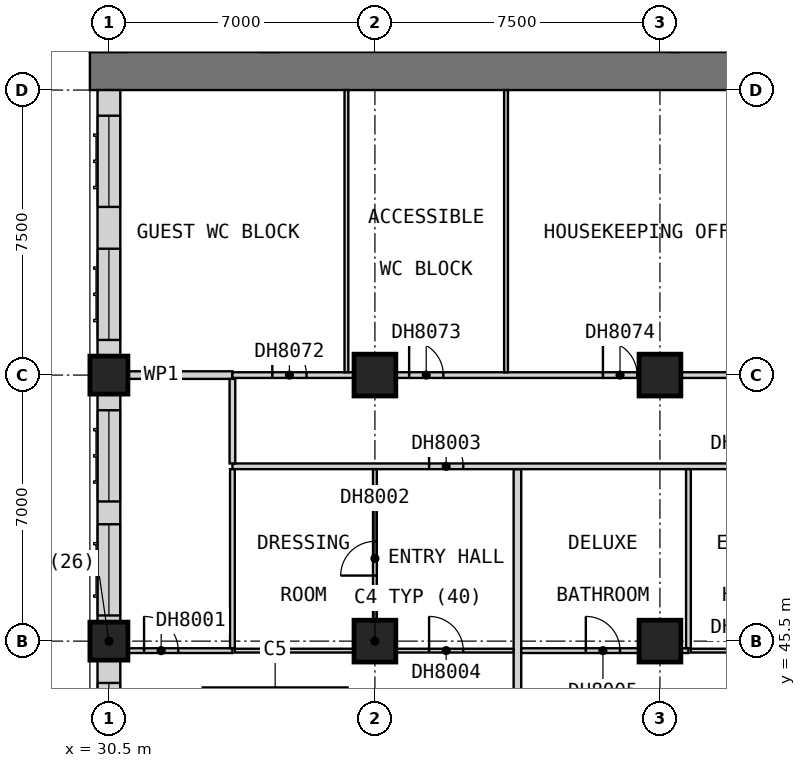
"""IFC4 building model, lengths in metres.
Left out: names, types, materials, properties, quantities, classifications, styles, units other than length and angle.
Written with IfcOpenShell. Run it as: python <this file> out.ifc"""

import sys

from ifc_helpers import new_model, si_unit, direction, frame, frame_2d, origin, origin_2d, place, context, subcontext, project, spatial, rectangle, extrude, element, fill, save


model = new_model("IFC4")
c1 = context("Model", 3, precision=1e-05, world=origin(), true_north=direction((0.0, 1.0)))
c2 = subcontext(c1, "Body", "Model", "MODEL_VIEW")
j1 = project(units=[si_unit("LENGTHUNIT", "METRE"), si_unit("PLANEANGLEUNIT", "RADIAN")], contexts=[c1])
p1 = place(None, origin())
s1 = spatial("IfcSite", under=j1, at=p1, CompositionType="ELEMENT")
p2 = place(p1, origin())
s2 = spatial("IfcBuilding", under=s1, at=p2, CompositionType="ELEMENT")
p3 = place(p2, frame((0.0, 0.0, 89.9)))
s3 = spatial("IfcBuildingStorey", under=s2, at=p3, CompositionType="ELEMENT", Elevation=89.9)
for number, where, z_axis, x_axis in (
    (1, (30.5, 45.5, 0.0), (0.0, 0.0, 1.0), (1.0, 0.0, 0.0)),
    (2, (30.5, 52.5, 0.0), (0.0, 0.0, 1.0), (1.0, 0.0, 0.0)),
):
    element("IfcColumn", number, at=place(p3, frame(where, z_axis=z_axis, x_axis=x_axis)), inside=s3, PredefinedType="COLUMN", context=c2, shape_type="SweptSolid", body=[
        extrude(rectangle(XDim=1.0, YDim=1.0, at=origin_2d()), origin(), (0.0, 0.0, 1.0), 3.6),
    ])
for number, where, z_axis, x_axis in (
    (3, (37.5, 45.5, 0.0), (0.0, 0.0, 1.0), (1.0, 0.0, 0.0)),
    (4, (37.5, 52.5, 0.0), (0.0, 0.0, 1.0), (1.0, 0.0, 0.0)),
    (5, (45.0, 45.5, 0.0), (0.0, 0.0, 1.0), (1.0, 0.0, 0.0)),
    (6, (45.0, 52.5, 0.0), (0.0, 0.0, 1.0), (1.0, 0.0, 0.0)),
):
    element("IfcColumn", number, at=place(p3, frame(where, z_axis=z_axis, x_axis=x_axis)), inside=s3, PredefinedType="COLUMN", context=c2, shape_type="SweptSolid", body=[
        extrude(rectangle(XDim=1.1, YDim=1.1, at=origin_2d()), origin(), (0.0, 0.0, 1.0), 3.6),
    ])
p4 = place(p3, frame((30.0, 60.5, 0.0), z_axis=(0.0, 0.0, 1.0), x_axis=(1.0, 0.0, 0.0)))
e7 = element("IfcWall", 7, at=p4, inside=s3, PredefinedType="SHEAR", context=c2, shape_type="SweptSolid", body=[
    extrude(rectangle(XDim=30.0, YDim=1.0, at=frame_2d((15.0, 0.0))), origin(), (0.0, 0.0, 1.0), 3.6),
])
p5 = place(p4, frame((21.9, 0.0, 0.0)))
e8 = element("IfcOpeningElement", 8, at=p5, cuts=e7, PredefinedType="OPENING", context=c2, shape_type="SweptSolid", body=[
    extrude(rectangle(XDim=1.8, YDim=2.1, at=frame_2d((0.9, 1.05))), frame((0.0, 0.51, 0.0), z_axis=(0.0, -1.0, 0.0), x_axis=(1.0, 0.0, 0.0)), (0.0, 0.0, 1.0), 1.02),
])
p6 = place(p4, frame((26.5, 0.0, 0.0)))
e9 = element("IfcOpeningElement", 9, at=p6, cuts=e7, PredefinedType="OPENING", context=c2, shape_type="SweptSolid", body=[
    extrude(rectangle(XDim=1.2, YDim=2.1, at=frame_2d((0.6, 1.05))), frame((0.0, 0.51, 0.0), z_axis=(0.0, -1.0, 0.0), x_axis=(1.0, 0.0, 0.0)), (0.0, 0.0, 1.0), 1.02),
])
p7 = place(p3, frame((30.5, 60.0, 0.0), z_axis=(0.0, 0.0, 1.0), x_axis=(0.0, -1.0, 0.0)))
e10 = element("IfcWall", 10, at=p7, inside=s3, PredefinedType="SOLIDWALL", context=c2, shape_type="SweptSolid", body=[
    extrude(rectangle(XDim=7.0, YDim=0.6, at=frame_2d((3.5, 0.0))), origin(), (0.0, 0.0, 1.0), 3.35),
])
p8 = place(p7, frame((4.175, 0.0, 0.8)))
e11 = element("IfcOpeningElement", 11, at=p8, cuts=e10, PredefinedType="OPENING", context=c2, shape_type="SweptSolid", body=[
    extrude(rectangle(XDim=2.4, YDim=1.8, at=frame_2d((1.2, 0.9))), frame((0.0, 0.31, 0.0), z_axis=(0.0, -1.0, 0.0), x_axis=(1.0, 0.0, 0.0)), (0.0, 0.0, 1.0), 0.62),
])
p9 = place(p7, frame((0.675, 0.0, 0.8)))
e12 = element("IfcOpeningElement", 12, at=p9, cuts=e10, PredefinedType="OPENING", context=c2, shape_type="SweptSolid", body=[
    extrude(rectangle(XDim=2.4, YDim=1.8, at=frame_2d((1.2, 0.9))), frame((0.0, 0.31, 0.0), z_axis=(0.0, -1.0, 0.0), x_axis=(1.0, 0.0, 0.0)), (0.0, 0.0, 1.0), 0.62),
])
p10 = place(p3, frame((30.5, 52.0, 0.0), z_axis=(0.0, 0.0, 1.0), x_axis=(0.0, -1.0, 0.0)))
e13 = element("IfcWall", 13, at=p10, inside=s3, PredefinedType="SOLIDWALL", context=c2, shape_type="SweptSolid", body=[
    extrude(rectangle(XDim=6.0, YDim=0.6, at=frame_2d((3.0, 0.0))), origin(), (0.0, 0.0, 1.0), 2.85),
])
p11 = place(p10, frame((3.425, 0.0, 0.8)))
e14 = element("IfcOpeningElement", 14, at=p11, cuts=e13, PredefinedType="OPENING", context=c2, shape_type="SweptSolid", body=[
    extrude(rectangle(XDim=2.4, YDim=1.8, at=frame_2d((1.2, 0.9))), frame((0.0, 0.31, 0.0), z_axis=(0.0, -1.0, 0.0), x_axis=(1.0, 0.0, 0.0)), (0.0, 0.0, 1.0), 0.62),
])
p12 = place(p10, frame((0.425, 0.0, 0.8)))
e15 = element("IfcOpeningElement", 15, at=p12, cuts=e13, PredefinedType="OPENING", context=c2, shape_type="SweptSolid", body=[
    extrude(rectangle(XDim=2.4, YDim=1.8, at=frame_2d((1.2, 0.9))), frame((0.0, 0.31, 0.0), z_axis=(0.0, -1.0, 0.0), x_axis=(1.0, 0.0, 0.0)), (0.0, 0.0, 1.0), 0.62),
])
p13 = place(p3, frame((30.5, 45.0, 0.0), z_axis=(0.0, 0.0, 1.0), x_axis=(0.0, -1.0, 0.0)))
e16 = element("IfcWall", 16, at=p13, inside=s3, PredefinedType="SOLIDWALL", context=c2, shape_type="SweptSolid", body=[
    extrude(rectangle(XDim=4.5, YDim=0.6, at=frame_2d((2.25, 0.0))), origin(), (0.0, 0.0, 1.0), 2.85),
])
p14 = place(p13, frame((0.6, 0.0, 0.8)))
e17 = element("IfcOpeningElement", 17, at=p14, cuts=e16, PredefinedType="OPENING", context=c2, shape_type="SweptSolid", body=[
    extrude(rectangle(XDim=2.4, YDim=1.8, at=frame_2d((1.2, 0.9))), frame((0.0, 0.31, 0.0), z_axis=(0.0, -1.0, 0.0), x_axis=(1.0, 0.0, 0.0)), (0.0, 0.0, 1.0), 0.62),
])
p15 = place(p3, frame((30.0, 52.5, 0.0), z_axis=(0.0, 0.0, 1.0), x_axis=(1.0, 0.0, 0.0)))
e18 = element("IfcWall", 18, at=p15, inside=s3, PredefinedType="PARTITIONING", context=c2, shape_type="SweptSolid", body=[
    extrude(rectangle(XDim=3.75, YDim=0.2, at=frame_2d((1.875, 0.0))), origin(), (0.0, 0.0, 1.0), 3.35),
])
p16 = place(p3, frame((41.25, 38.31, 0.0), z_axis=(0.0, 0.0, 1.0), x_axis=(0.0, 1.0, 0.0)))
e19 = element("IfcWall", 19, at=p16, inside=s3, PredefinedType="PARTITIONING", context=c2, shape_type="SweptSolid", body=[
    extrude(rectangle(XDim=11.715, YDim=0.2, at=frame_2d((5.857, 0.0))), origin(), (0.0, 0.0, 1.0), 3.35),
])
p17 = place(p3, frame((33.75, 50.1, 0.0), z_axis=(0.0, 0.0, 1.0), x_axis=(1.0, 0.0, 0.0)))
e20 = element("IfcWall", 20, at=p17, inside=s3, PredefinedType="PARTITIONING", context=c2, shape_type="SweptSolid", body=[
    extrude(rectangle(XDim=43.65, YDim=0.15, at=frame_2d((21.825, 0.0))), origin(), (0.0, 0.0, 1.0), 3.35),
])
p18 = place(p17, frame((5.175, 0.0, 0.0)))
e21 = element("IfcOpeningElement", 21, at=p18, cuts=e20, PredefinedType="OPENING", context=c2, shape_type="SweptSolid", body=[
    extrude(rectangle(XDim=0.9, YDim=2.1, at=frame_2d((0.45, 1.05))), frame((0.0, 0.085, 0.0), z_axis=(0.0, -1.0, 0.0), x_axis=(1.0, 0.0, 0.0)), (0.0, 0.0, 1.0), 0.17),
])
p19 = place(p17, frame((13.05, 0.0, 0.0)))
e22 = element("IfcOpeningElement", 22, at=p19, cuts=e20, PredefinedType="OPENING", context=c2, shape_type="SweptSolid", body=[
    extrude(rectangle(XDim=0.9, YDim=2.1, at=frame_2d((0.45, 1.05))), frame((0.0, 0.085, 0.0), z_axis=(0.0, -1.0, 0.0), x_axis=(1.0, 0.0, 0.0)), (0.0, 0.0, 1.0), 0.17),
])
p20 = place(p17, frame((17.363, 0.0, 0.0)))
e23 = element("IfcOpeningElement", 23, at=p20, cuts=e20, PredefinedType="OPENING", context=c2, shape_type="SweptSolid", body=[
    extrude(rectangle(XDim=0.9, YDim=2.1, at=frame_2d((0.45, 1.05))), frame((0.0, 0.085, 0.0), z_axis=(0.0, -1.0, 0.0), x_axis=(1.0, 0.0, 0.0)), (0.0, 0.0, 1.0), 0.17),
])
p21 = place(p17, frame((21.113, 0.0, 0.0)))
e24 = element("IfcOpeningElement", 24, at=p21, cuts=e20, PredefinedType="OPENING", context=c2, shape_type="SweptSolid", body=[
    extrude(rectangle(XDim=0.9, YDim=2.1, at=frame_2d((0.45, 1.05))), frame((0.0, 0.085, 0.0), z_axis=(0.0, -1.0, 0.0), x_axis=(1.0, 0.0, 0.0)), (0.0, 0.0, 1.0), 0.17),
])
p22 = place(p17, frame((28.05, 0.0, 0.0)))
e25 = element("IfcOpeningElement", 25, at=p22, cuts=e20, PredefinedType="OPENING", context=c2, shape_type="SweptSolid", body=[
    extrude(rectangle(XDim=0.9, YDim=2.1, at=frame_2d((0.45, 1.05))), frame((0.0, 0.085, 0.0), z_axis=(0.0, -1.0, 0.0), x_axis=(1.0, 0.0, 0.0)), (0.0, 0.0, 1.0), 0.17),
])
p23 = place(p17, frame((32.363, 0.0, 0.0)))
e26 = element("IfcOpeningElement", 26, at=p23, cuts=e20, PredefinedType="OPENING", context=c2, shape_type="SweptSolid", body=[
    extrude(rectangle(XDim=0.9, YDim=2.1, at=frame_2d((0.45, 1.05))), frame((0.0, 0.085, 0.0), z_axis=(0.0, -1.0, 0.0), x_axis=(1.0, 0.0, 0.0)), (0.0, 0.0, 1.0), 0.17),
])
p24 = place(p17, frame((39.3, 0.0, 0.0)))
e27 = element("IfcOpeningElement", 27, at=p24, cuts=e20, PredefinedType="OPENING", context=c2, shape_type="SweptSolid", body=[
    extrude(rectangle(XDim=0.9, YDim=2.1, at=frame_2d((0.45, 1.05))), frame((0.0, 0.085, 0.0), z_axis=(0.0, -1.0, 0.0), x_axis=(1.0, 0.0, 0.0)), (0.0, 0.0, 1.0), 0.17),
])
p25 = place(p17, frame((42.0, 0.0, 0.0)))
e28 = element("IfcOpeningElement", 28, at=p25, cuts=e20, PredefinedType="OPENING", context=c2, shape_type="SweptSolid", body=[
    extrude(rectangle(XDim=0.9, YDim=2.1, at=frame_2d((0.45, 1.05))), frame((0.0, 0.085, 0.0), z_axis=(0.0, -1.0, 0.0), x_axis=(1.0, 0.0, 0.0)), (0.0, 0.0, 1.0), 0.17),
])
p26 = place(p3, frame((33.75, 52.5, 0.0), z_axis=(0.0, 0.0, 1.0), x_axis=(1.0, 0.0, 0.0)))
e29 = element("IfcWall", 29, at=p26, inside=s3, PredefinedType="PARTITIONING", context=c2, shape_type="SweptSolid", body=[
    extrude(rectangle(XDim=17.15, YDim=0.15, at=frame_2d((8.575, 0.0))), origin(), (0.0, 0.0, 1.0), 3.35),
])
p27 = place(p26, frame((1.05, 0.0, 0.0)))
e30 = element("IfcOpeningElement", 30, at=p27, cuts=e29, PredefinedType="OPENING", context=c2, shape_type="SweptSolid", body=[
    extrude(rectangle(XDim=0.9, YDim=2.1, at=frame_2d((0.45, 1.05))), frame((0.0, 0.085, 0.0), z_axis=(0.0, -1.0, 0.0), x_axis=(1.0, 0.0, 0.0)), (0.0, 0.0, 1.0), 0.17),
])
p28 = place(p26, frame((4.65, 0.0, 0.0)))
e31 = element("IfcOpeningElement", 31, at=p28, cuts=e29, PredefinedType="OPENING", context=c2, shape_type="SweptSolid", body=[
    extrude(rectangle(XDim=0.9, YDim=2.1, at=frame_2d((0.45, 1.05))), frame((0.0, 0.085, 0.0), z_axis=(0.0, -1.0, 0.0), x_axis=(1.0, 0.0, 0.0)), (0.0, 0.0, 1.0), 0.17),
])
p29 = place(p26, frame((9.75, 0.0, 0.0)))
e32 = element("IfcOpeningElement", 32, at=p29, cuts=e29, PredefinedType="OPENING", context=c2, shape_type="SweptSolid", body=[
    extrude(rectangle(XDim=0.9, YDim=2.1, at=frame_2d((0.45, 1.05))), frame((0.0, 0.085, 0.0), z_axis=(0.0, -1.0, 0.0), x_axis=(1.0, 0.0, 0.0)), (0.0, 0.0, 1.0), 0.17),
])
p30 = place(p26, frame((15.625, 0.0, 0.0)))
e33 = element("IfcOpeningElement", 33, at=p30, cuts=e29, PredefinedType="OPENING", context=c2, shape_type="SweptSolid", body=[
    extrude(rectangle(XDim=0.9, YDim=2.1, at=frame_2d((0.45, 1.05))), frame((0.0, 0.085, 0.0), z_axis=(0.0, -1.0, 0.0), x_axis=(1.0, 0.0, 0.0)), (0.0, 0.0, 1.0), 0.17),
])
p31 = place(p3, frame((33.75, 50.175, 0.0), z_axis=(0.0, 0.0, 1.0), x_axis=(0.0, 1.0, 0.0)))
e34 = element("IfcWall", 34, at=p31, inside=s3, PredefinedType="PARTITIONING", context=c2, shape_type="SweptSolid", body=[
    extrude(rectangle(XDim=2.225, YDim=0.15, at=frame_2d((1.112, 0.0))), origin(), (0.0, 0.0, 1.0), 3.35),
])
p32 = place(p3, frame((33.812, 45.25, 0.0), z_axis=(0.0, 0.0, 1.0), x_axis=(1.0, 0.0, 0.0)))
e35 = element("IfcWall", 35, at=p32, inside=s3, PredefinedType="PARTITIONING", context=c2, shape_type="SweptSolid", body=[
    extrude(rectangle(XDim=7.337, YDim=0.1, at=frame_2d((3.669, 0.0))), origin(), (0.0, 0.0, 1.0), 3.35),
])
p33 = place(p32, frame((5.113, 0.0, 0.0)))
e36 = element("IfcOpeningElement", 36, at=p33, cuts=e35, PredefinedType="OPENING", context=c2, shape_type="SweptSolid", body=[
    extrude(rectangle(XDim=0.9, YDim=2.1, at=frame_2d((0.45, 1.05))), frame((0.0, 0.06, 0.0), z_axis=(0.0, -1.0, 0.0), x_axis=(1.0, 0.0, 0.0)), (0.0, 0.0, 1.0), 0.12),
])
p34 = place(p3, frame((45.812, 45.25, 0.0), z_axis=(0.0, 0.0, 1.0), x_axis=(1.0, 0.0, 0.0)))
e37 = element("IfcWall", 37, at=p34, inside=s3, PredefinedType="PARTITIONING", context=c2, shape_type="SweptSolid", body=[
    extrude(rectangle(XDim=2.837, YDim=0.1, at=frame_2d((1.419, 0.0))), origin(), (0.0, 0.0, 1.0), 3.35),
])
p35 = place(p34, frame((0.988, 0.0, 0.0)))
e38 = element("IfcOpeningElement", 38, at=p35, cuts=e37, PredefinedType="OPENING", context=c2, shape_type="SweptSolid", body=[
    extrude(rectangle(XDim=0.9, YDim=2.1, at=frame_2d((0.45, 1.05))), frame((0.0, 0.06, 0.0), z_axis=(0.0, -1.0, 0.0), x_axis=(1.0, 0.0, 0.0)), (0.0, 0.0, 1.0), 0.12),
])
p36 = place(p3, frame((36.75, 52.575, 0.0), z_axis=(0.0, 0.0, 1.0), x_axis=(0.0, 1.0, 0.0)))
e39 = element("IfcWall", 39, at=p36, inside=s3, PredefinedType="PARTITIONING", context=c2, shape_type="SweptSolid", body=[
    extrude(rectangle(XDim=7.425, YDim=0.1, at=frame_2d((3.712, 0.0))), origin(), (0.0, 0.0, 1.0), 3.35),
])
p37 = place(p3, frame((37.5, 45.3, 0.0), z_axis=(0.0, 0.0, 1.0), x_axis=(0.0, 1.0, 0.0)))
e40 = element("IfcWall", 40, at=p37, inside=s3, PredefinedType="PARTITIONING", context=c2, shape_type="SweptSolid", body=[
    extrude(rectangle(XDim=4.725, YDim=0.1, at=frame_2d((2.362, 0.0))), origin(), (0.0, 0.0, 1.0), 3.35),
])
p38 = place(p37, frame((1.925, 0.0, 0.0)))
e41 = element("IfcOpeningElement", 41, at=p38, cuts=e40, PredefinedType="OPENING", context=c2, shape_type="SweptSolid", body=[
    extrude(rectangle(XDim=0.9, YDim=2.1, at=frame_2d((0.45, 1.05))), frame((0.0, 0.06, 0.0), z_axis=(0.0, -1.0, 0.0), x_axis=(1.0, 0.0, 0.0)), (0.0, 0.0, 1.0), 0.12),
])
p39 = place(p3, frame((40.95, 52.575, 0.0), z_axis=(0.0, 0.0, 1.0), x_axis=(0.0, 1.0, 0.0)))
e42 = element("IfcWall", 42, at=p39, inside=s3, PredefinedType="PARTITIONING", context=c2, shape_type="SweptSolid", body=[
    extrude(rectangle(XDim=7.425, YDim=0.1, at=frame_2d((3.712, 0.0))), origin(), (0.0, 0.0, 1.0), 3.35),
])
p40 = place(p3, frame((30.0, 45.25, 0.0), z_axis=(0.0, 0.0, 1.0), x_axis=(1.0, 0.0, 0.0)))
e43 = element("IfcWall", 43, at=p40, inside=s3, PredefinedType="PARTITIONING", context=c2, shape_type="SweptSolid", body=[
    extrude(rectangle(XDim=3.75, YDim=0.125, at=frame_2d((1.875, 0.0))), origin(), (0.0, 0.0, 1.0), 3.35),
])
p41 = place(p40, frame((1.425, 0.0, 0.0)))
e44 = element("IfcOpeningElement", 44, at=p41, cuts=e43, PredefinedType="OPENING", context=c2, shape_type="SweptSolid", body=[
    extrude(rectangle(XDim=0.9, YDim=2.1, at=frame_2d((0.45, 1.05))), frame((0.0, 0.073, 0.0), z_axis=(0.0, -1.0, 0.0), x_axis=(1.0, 0.0, 0.0)), (0.0, 0.0, 1.0), 0.145),
])
p42 = place(p3, frame((41.35, 45.25, 0.0), z_axis=(0.0, 0.0, 1.0), x_axis=(1.0, 0.0, 0.0)))
e45 = element("IfcWall", 45, at=p42, inside=s3, PredefinedType="PARTITIONING", context=c2, shape_type="SweptSolid", body=[
    extrude(rectangle(XDim=4.4, YDim=0.125, at=frame_2d((2.2, 0.0))), origin(), (0.0, 0.0, 1.0), 3.35),
])
p43 = place(p42, frame((1.7, 0.0, 0.0)))
e46 = element("IfcOpeningElement", 46, at=p43, cuts=e45, PredefinedType="OPENING", context=c2, shape_type="SweptSolid", body=[
    extrude(rectangle(XDim=0.9, YDim=2.1, at=frame_2d((0.45, 1.05))), frame((0.0, 0.073, 0.0), z_axis=(0.0, -1.0, 0.0), x_axis=(1.0, 0.0, 0.0)), (0.0, 0.0, 1.0), 0.145),
])
for number, where, z_axis, x_axis in (
    (47, (33.75, 45.312, 0.0), (0.0, 0.0, 1.0), (0.0, 1.0, 0.0)),
    (48, (45.75, 45.312, 0.0), (0.0, 0.0, 1.0), (0.0, 1.0, 0.0)),
):
    element("IfcWall", number, at=place(p3, frame(where, z_axis=z_axis, x_axis=x_axis)), inside=s3, PredefinedType="PARTITIONING", context=c2, shape_type="SweptSolid", body=[
        extrude(rectangle(XDim=4.712, YDim=0.125, at=frame_2d((2.356, 0.0))), origin(), (0.0, 0.0, 1.0), 3.35),
    ])
p44 = place(p8, origin())
e49 = element("IfcWindow", 49, at=p44, inside=s3, PartitioningType="SINGLE_PANEL", PredefinedType="WINDOW", context=c2, shape_type="SweptSolid", body=[
    extrude(rectangle(XDim=2.4, YDim=1.8, at=frame_2d((1.2, 0.9))), frame((0.0, -0.07, 0.0), z_axis=(0.0, -1.0, 0.0), x_axis=(1.0, 0.0, 0.0)), (0.0, 0.0, 1.0), 0.06),
])
fill(e11, e49)
p45 = place(p9, origin())
e50 = element("IfcWindow", 50, at=p45, inside=s3, PartitioningType="SINGLE_PANEL", PredefinedType="WINDOW", context=c2, shape_type="SweptSolid", body=[
    extrude(rectangle(XDim=2.4, YDim=1.8, at=frame_2d((1.2, 0.9))), frame((0.0, -0.07, 0.0), z_axis=(0.0, -1.0, 0.0), x_axis=(1.0, 0.0, 0.0)), (0.0, 0.0, 1.0), 0.06),
])
fill(e12, e50)
p46 = place(p11, origin())
e51 = element("IfcWindow", 51, at=p46, inside=s3, PartitioningType="SINGLE_PANEL", PredefinedType="WINDOW", context=c2, shape_type="SweptSolid", body=[
    extrude(rectangle(XDim=2.4, YDim=1.8, at=frame_2d((1.2, 0.9))), frame((0.0, -0.07, 0.0), z_axis=(0.0, -1.0, 0.0), x_axis=(1.0, 0.0, 0.0)), (0.0, 0.0, 1.0), 0.06),
])
fill(e14, e51)
p47 = place(p12, origin())
e52 = element("IfcWindow", 52, at=p47, inside=s3, PartitioningType="SINGLE_PANEL", PredefinedType="WINDOW", context=c2, shape_type="SweptSolid", body=[
    extrude(rectangle(XDim=2.4, YDim=1.8, at=frame_2d((1.2, 0.9))), frame((0.0, -0.07, 0.0), z_axis=(0.0, -1.0, 0.0), x_axis=(1.0, 0.0, 0.0)), (0.0, 0.0, 1.0), 0.06),
])
fill(e15, e52)
p48 = place(p14, origin())
e53 = element("IfcWindow", 53, at=p48, inside=s3, PartitioningType="SINGLE_PANEL", PredefinedType="WINDOW", context=c2, shape_type="SweptSolid", body=[
    extrude(rectangle(XDim=2.4, YDim=1.8, at=frame_2d((1.2, 0.9))), frame((0.0, -0.07, 0.0), z_axis=(0.0, -1.0, 0.0), x_axis=(1.0, 0.0, 0.0)), (0.0, 0.0, 1.0), 0.06),
])
fill(e17, e53)
p49 = place(p41, origin())
e54 = element("IfcDoor", 54, at=p49, inside=s3, OperationType="SINGLE_SWING_LEFT", PredefinedType="DOOR", context=c2, shape_type="SweptSolid", body=[
    extrude(rectangle(XDim=0.9, YDim=2.1, at=frame_2d((0.45, 1.05))), frame((0.0, 0.025, 0.0), z_axis=(0.0, -1.0, 0.0), x_axis=(1.0, 0.0, 0.0)), (0.0, 0.0, 1.0), 0.05),
])
fill(e44, e54)
p50 = place(p38, origin())
e55 = element("IfcDoor", 55, at=p50, inside=s3, OperationType="SINGLE_SWING_RIGHT", PredefinedType="DOOR", context=c2, shape_type="SweptSolid", body=[
    extrude(rectangle(XDim=0.9, YDim=2.1, at=frame_2d((0.45, 1.05))), frame((0.0, 0.025, 0.0), z_axis=(0.0, -1.0, 0.0), x_axis=(1.0, 0.0, 0.0)), (0.0, 0.0, 1.0), 0.05),
])
fill(e41, e55)
p51 = place(p18, origin())
e56 = element("IfcDoor", 56, at=p51, inside=s3, OperationType="SINGLE_SWING_RIGHT", PredefinedType="DOOR", context=c2, shape_type="SweptSolid", body=[
    extrude(rectangle(XDim=0.9, YDim=2.1, at=frame_2d((0.45, 1.05))), frame((0.0, 0.025, 0.0), z_axis=(0.0, -1.0, 0.0), x_axis=(1.0, 0.0, 0.0)), (0.0, 0.0, 1.0), 0.05),
])
fill(e21, e56)
p52 = place(p33, origin())
e57 = element("IfcDoor", 57, at=p52, inside=s3, OperationType="SINGLE_SWING_LEFT", PredefinedType="DOOR", context=c2, shape_type="SweptSolid", body=[
    extrude(rectangle(XDim=0.9, YDim=2.1, at=frame_2d((0.45, 1.05))), frame((0.0, 0.025, 0.0), z_axis=(0.0, -1.0, 0.0), x_axis=(1.0, 0.0, 0.0)), (0.0, 0.0, 1.0), 0.05),
])
fill(e36, e57)
p53 = place(p43, origin())
e58 = element("IfcDoor", 58, at=p53, inside=s3, OperationType="SINGLE_SWING_LEFT", PredefinedType="DOOR", context=c2, shape_type="SweptSolid", body=[
    extrude(rectangle(XDim=0.9, YDim=2.1, at=frame_2d((0.45, 1.05))), frame((0.0, 0.025, 0.0), z_axis=(0.0, -1.0, 0.0), x_axis=(1.0, 0.0, 0.0)), (0.0, 0.0, 1.0), 0.05),
])
fill(e46, e58)
p54 = place(p27, origin())
e59 = element("IfcDoor", 59, at=p54, inside=s3, OperationType="SINGLE_SWING_LEFT", PredefinedType="DOOR", context=c2, shape_type="SweptSolid", body=[
    extrude(rectangle(XDim=0.9, YDim=2.1, at=frame_2d((0.45, 1.05))), frame((0.0, 0.025, 0.0), z_axis=(0.0, -1.0, 0.0), x_axis=(1.0, 0.0, 0.0)), (0.0, 0.0, 1.0), 0.05),
])
fill(e30, e59)
p55 = place(p28, origin())
e60 = element("IfcDoor", 60, at=p55, inside=s3, OperationType="SINGLE_SWING_LEFT", PredefinedType="DOOR", context=c2, shape_type="SweptSolid", body=[
    extrude(rectangle(XDim=0.9, YDim=2.1, at=frame_2d((0.45, 1.05))), frame((0.0, 0.025, 0.0), z_axis=(0.0, -1.0, 0.0), x_axis=(1.0, 0.0, 0.0)), (0.0, 0.0, 1.0), 0.05),
])
fill(e31, e60)
p56 = place(p29, origin())
e61 = element("IfcDoor", 61, at=p56, inside=s3, OperationType="SINGLE_SWING_LEFT", PredefinedType="DOOR", context=c2, shape_type="SweptSolid", body=[
    extrude(rectangle(XDim=0.9, YDim=2.1, at=frame_2d((0.45, 1.05))), frame((0.0, 0.025, 0.0), z_axis=(0.0, -1.0, 0.0), x_axis=(1.0, 0.0, 0.0)), (0.0, 0.0, 1.0), 0.05),
])
fill(e32, e61)
save(model, sys.argv[1])
